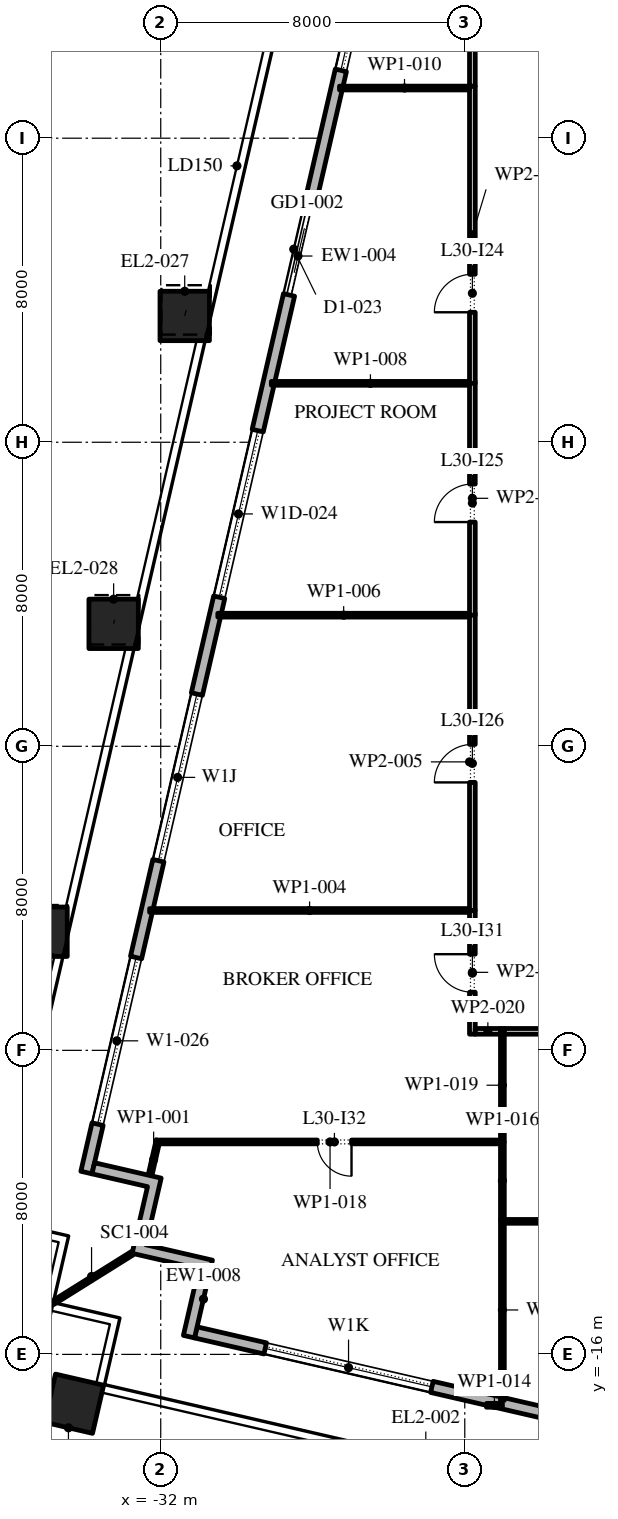
"""IFC4 building model, lengths in metres.
Left out: names, types, materials, properties, quantities, classifications, styles, units other than length and angle.
Written with IfcOpenShell. Run it as: python <this file> out.ifc"""

import sys

from ifc_helpers import new_model, si_unit, direction, frame, frame_2d, origin, origin_2d, place, context, subcontext, project, spatial, polyline, rectangle, outline, extrude, element, fill, save


model = new_model("IFC4")
c1 = context("Model", 3, precision=1e-05, world=origin(), true_north=direction((0.0, 1.0)))
c2 = subcontext(c1, "Body", "Model", "MODEL_VIEW")
j1 = project(units=[si_unit("LENGTHUNIT", "METRE"), si_unit("PLANEANGLEUNIT", "RADIAN")], contexts=[c1])
p1 = place(None, origin())
s1 = spatial("IfcSite", under=j1, at=p1, CompositionType="ELEMENT")
p2 = place(p1, origin())
s2 = spatial("IfcBuilding", under=s1, at=p2, CompositionType="ELEMENT")
p3 = place(p2, frame((0.0, 0.0, 139.2)))
s3 = spatial("IfcBuildingStorey", under=s2, at=p3, CompositionType="ELEMENT", Elevation=139.2)
p4 = place(p3, frame((-34.282, -17.298, 0.0), z_axis=(0.0, 0.0, 1.0), x_axis=(0.974370064785, -0.224951054344, 0.0)))
e1 = element("IfcColumn", 1, at=p4, inside=s3, PredefinedType="COLUMN", context=c2, shape_type="SweptSolid", body=[
    extrude(rectangle(XDim=1.3, YDim=1.3, at=origin_2d()), origin(), (0.0, 0.0, 1.0), 4.2),
])
p5 = place(p3, frame((-31.369, 11.323, 0.0), z_axis=(0.008770884695, 0.037929719907, 0.99924191662), x_axis=(-0.974290512438, 0.225295355862, 0.0)))
e2 = element("IfcColumn", 2, at=p5, inside=s3, PredefinedType="COLUMN", context=c2, shape_type="SweptSolid", body=[
    extrude(rectangle(XDim=1.3, YDim=1.3, at=origin_2d()), origin(), (0.0, 0.0, 1.0), 4.203),
])
p6 = place(p3, frame((-33.24, 3.222, 0.0), z_axis=(0.005869083212, 0.025335844359, 0.999661767226), x_axis=(-0.974202561131, 0.225675363932, 0.0)))
e3 = element("IfcColumn", 3, at=p6, inside=s3, PredefinedType="COLUMN", context=c2, shape_type="SweptSolid", body=[
    extrude(rectangle(XDim=1.3, YDim=1.3, at=origin_2d()), origin(), (0.0, 0.0, 1.0), 4.201),
])
p7 = place(p3, frame((-35.11, -4.879, 0.0), z_axis=(0.002906226325, 0.012613022249, 0.99991622925), x_axis=(-0.974466825284, 0.224531526563, 0.0)))
e4 = element("IfcColumn", 4, at=p7, inside=s3, PredefinedType="COLUMN", context=c2, shape_type="SweptSolid", body=[
    extrude(rectangle(XDim=1.3, YDim=1.3, at=origin_2d()), origin(), (0.0, 0.0, 1.0), 4.2),
])
p8 = place(p3, frame((-35.631, -15.139, 0.0), z_axis=(0.0, 0.0, 1.0), x_axis=(0.974370064785, -0.224951054344, 0.0)))
e5 = element("IfcColumn", 5, at=p8, inside=s3, PredefinedType="COLUMN", context=c2, shape_type="SweptSolid", body=[
    extrude(rectangle(XDim=1.3, YDim=1.3, at=origin_2d()), origin(), (0.0, 0.0, 1.0), 4.2),
])
p9 = place(p3, frame((-31.078, -15.421, 0.0), z_axis=(0.0, 0.0, 1.0), x_axis=(0.974370456532, -0.224949357493, 0.0)))
e6 = element("IfcWall", 6, at=p9, inside=s3, PredefinedType="STANDARD", context=c2, shape_type="SweptSolid", body=[
    extrude(rectangle(XDim=51.0, YDim=0.3, at=frame_2d((25.5, 0.0))), origin(), (0.0, 0.0, 1.0), 4.0),
])
p10 = place(p9, frame((1.875, 0.0, 0.45)))
e7 = element("IfcOpeningElement", 7, at=p10, cuts=e6, PredefinedType="OPENING", context=c2, shape_type="SweptSolid", body=[
    extrude(rectangle(XDim=4.5, YDim=2.65, at=frame_2d((2.25, 1.325))), frame((0.0, 0.16, 0.0), z_axis=(0.0, -1.0, 0.0), x_axis=(1.0, 0.0, 0.0)), (0.0, 0.0, 1.0), 0.32),
])
p11 = place(p9, frame((10.275, 0.0, 0.45)))
e8 = element("IfcOpeningElement", 8, at=p11, cuts=e6, PredefinedType="OPENING", context=c2, shape_type="SweptSolid", body=[
    extrude(rectangle(XDim=4.5, YDim=2.525, at=frame_2d((2.25, 1.262))), frame((0.0, 0.16, 0.0), z_axis=(0.0, -1.0, 0.0), x_axis=(1.0, 0.0, 0.0)), (0.0, 0.0, 1.0), 0.32),
])
p12 = place(p9, frame((18.825, 0.0, 0.45)))
e9 = element("IfcOpeningElement", 9, at=p12, cuts=e6, PredefinedType="OPENING", context=c2, shape_type="SweptSolid", body=[
    extrude(rectangle(XDim=4.5, YDim=2.5, at=frame_2d((2.25, 1.25))), frame((0.0, 0.16, 0.0), z_axis=(0.0, -1.0, 0.0), x_axis=(1.0, 0.0, 0.0)), (0.0, 0.0, 1.0), 0.32),
])
p13 = place(p9, frame((28.425, 0.0, 0.0)))
e10 = element("IfcOpeningElement", 10, at=p13, cuts=e6, PredefinedType="OPENING", context=c2, shape_type="SweptSolid", body=[
    extrude(rectangle(XDim=2.4, YDim=2.9, at=frame_2d((1.2, 1.45))), frame((0.0, 0.16, 0.0), z_axis=(0.0, -1.0, 0.0), x_axis=(1.0, 0.0, 0.0)), (0.0, 0.0, 1.0), 0.32),
])
p14 = place(p9, frame((35.925, 0.0, 0.45)))
e11 = element("IfcOpeningElement", 11, at=p14, cuts=e6, PredefinedType="OPENING", context=c2, shape_type="SweptSolid", body=[
    extrude(rectangle(XDim=4.5, YDim=2.45, at=frame_2d((2.25, 1.225))), frame((0.0, 0.16, 0.0), z_axis=(0.0, -1.0, 0.0), x_axis=(1.0, 0.0, 0.0)), (0.0, 0.0, 1.0), 0.32),
])
p15 = place(p9, frame((44.475, 0.0, 0.45)))
e12 = element("IfcOpeningElement", 12, at=p15, cuts=e6, PredefinedType="OPENING", context=c2, shape_type="SweptSolid", body=[
    extrude(rectangle(XDim=4.5, YDim=2.45, at=frame_2d((2.25, 1.225))), frame((0.0, 0.16, 0.0), z_axis=(0.0, -1.0, 0.0), x_axis=(1.0, 0.0, 0.0)), (0.0, 0.0, 1.0), 0.32),
])
p16 = place(p3, frame((-22.82, 37.016, 0.0), z_axis=(0.0, 0.0, 1.0), x_axis=(-0.224953880882, -0.974369412223, 0.0)))
e13 = element("IfcWall", 13, at=p16, inside=s3, PredefinedType="STANDARD", context=c2, shape_type="SweptSolid", body=[
    extrude(rectangle(XDim=49.5, YDim=0.3, at=frame_2d((24.75, 0.0))), origin(), (0.0, 0.0, 1.0), 4.0),
])
p17 = place(p16, frame((1.157, 0.0, 0.45)))
e14 = element("IfcOpeningElement", 14, at=p17, cuts=e13, PredefinedType="OPENING", context=c2, shape_type="SweptSolid", body=[
    extrude(rectangle(XDim=4.5, YDim=3.05, at=frame_2d((2.25, 1.525))), frame((0.0, 0.16, 0.0), z_axis=(0.0, -1.0, 0.0), x_axis=(1.0, 0.0, 0.0)), (0.0, 0.0, 1.0), 0.32),
])
p18 = place(p16, frame((8.121, 0.0, 0.45)))
e15 = element("IfcOpeningElement", 15, at=p18, cuts=e13, PredefinedType="OPENING", context=c2, shape_type="SweptSolid", body=[
    extrude(rectangle(XDim=4.5, YDim=3.05, at=frame_2d((2.25, 1.525))), frame((0.0, 0.16, 0.0), z_axis=(0.0, -1.0, 0.0), x_axis=(1.0, 0.0, 0.0)), (0.0, 0.0, 1.0), 0.32),
])
p19 = place(p16, frame((15.236, 0.0, 0.45)))
e16 = element("IfcOpeningElement", 16, at=p19, cuts=e13, PredefinedType="OPENING", context=c2, shape_type="SweptSolid", body=[
    extrude(rectangle(XDim=4.5, YDim=3.05, at=frame_2d((2.25, 1.525))), frame((0.0, 0.16, 0.0), z_axis=(0.0, -1.0, 0.0), x_axis=(1.0, 0.0, 0.0)), (0.0, 0.0, 1.0), 0.32),
])
p20 = place(p16, frame((23.4, 0.0, 0.0)))
e17 = element("IfcOpeningElement", 17, at=p20, cuts=e13, PredefinedType="OPENING", context=c2, shape_type="SweptSolid", body=[
    extrude(rectangle(XDim=2.4, YDim=3.5, at=frame_2d((1.2, 1.75))), frame((0.0, 0.16, 0.0), z_axis=(0.0, -1.0, 0.0), x_axis=(1.0, 0.0, 0.0)), (0.0, 0.0, 1.0), 0.32),
])
p21 = place(p16, frame((29.464, 0.0, 0.45)))
e18 = element("IfcOpeningElement", 18, at=p21, cuts=e13, PredefinedType="OPENING", context=c2, shape_type="SweptSolid", body=[
    extrude(rectangle(XDim=4.5, YDim=2.875, at=frame_2d((2.25, 1.438))), frame((0.0, 0.16, 0.0), z_axis=(0.0, -1.0, 0.0), x_axis=(1.0, 0.0, 0.0)), (0.0, 0.0, 1.0), 0.32),
])
p22 = place(p16, frame((36.579, 0.0, 0.45)))
e19 = element("IfcOpeningElement", 19, at=p22, cuts=e13, PredefinedType="OPENING", context=c2, shape_type="SweptSolid", body=[
    extrude(rectangle(XDim=4.5, YDim=2.675, at=frame_2d((2.25, 1.337))), frame((0.0, 0.16, 0.0), z_axis=(0.0, -1.0, 0.0), x_axis=(1.0, 0.0, 0.0)), (0.0, 0.0, 1.0), 0.32),
])
p23 = place(p16, frame((43.693, 0.0, 0.45)))
e20 = element("IfcOpeningElement", 20, at=p23, cuts=e13, PredefinedType="OPENING", context=c2, shape_type="SweptSolid", body=[
    extrude(rectangle(XDim=4.5, YDim=3.05, at=frame_2d((2.25, 1.525))), frame((0.0, 0.16, 0.0), z_axis=(0.0, -1.0, 0.0), x_axis=(1.0, 0.0, 0.0)), (0.0, 0.0, 1.0), 0.32),
])
p24 = place(p3, origin())
e21 = element("IfcWall", 21, at=p24, inside=s3, PredefinedType="STANDARD", context=c2, shape_type="SweptSolid", body=[
    extrude(outline(polyline([(-32.393, -13.116), (-30.639, -13.521), (-31.111, -15.567), (-31.404, -15.5), (-30.999, -13.746), (-32.753, -13.341), (-32.348, -11.587), (-33.809, -11.25), (-33.742, -10.957), (-31.988, -11.362), (-32.393, -13.116)])), origin(), (0.0, 0.0, 1.0), 4.0),
])
p25 = place(p3, frame((-32.753, -13.341, -0.05), z_axis=(0.0, 0.0, 1.0), x_axis=(-0.848059759764, -0.529900598103, 0.0)))
e22 = element("IfcWall", 22, at=p25, inside=s3, PredefinedType="STANDARD", context=c2, shape_type="SweptSolid", body=[
    extrude(rectangle(XDim=2.455, YDim=0.1, at=frame_2d((1.228, 0.0))), origin(), (0.0, 0.0, 1.0), 4.05),
])
p26 = place(p3, frame((-32.069, -10.361, 0.0), z_axis=(0.0, 0.0, 1.0), x_axis=(-0.222987762652, -0.974821243976, 0.0)))
e23 = element("IfcWall", 23, at=p26, inside=s3, PredefinedType="PARTITIONING", context=c2, shape_type="SweptSolid", body=[
    extrude(rectangle(XDim=1.058, YDim=0.1, at=frame_2d((0.529, 0.0))), origin(), (0.0, 0.0, 1.0), 4.0),
])
p27 = place(p3, frame((-23.8, -7.575, 0.0), z_axis=(0.0, 0.0, 1.0), x_axis=(0.0, 1.0, 0.0)))
e24 = element("IfcWall", 24, at=p27, inside=s3, PredefinedType="PARTITIONING", context=c2, shape_type="SweptSolid", body=[
    extrude(rectangle(XDim=3.255, YDim=0.15, at=frame_2d((1.627, 0.0))), origin(), (0.0, 0.0, 1.0), 4.0),
])
p28 = place(p27, frame((1.105, 0.0, 0.0)))
e25 = element("IfcOpeningElement", 25, at=p28, cuts=e24, PredefinedType="OPENING", context=c2, shape_type="SweptSolid", body=[
    extrude(rectangle(XDim=1.0, YDim=2.1, at=frame_2d((0.5, 1.05))), frame((0.0, 0.085, 0.0), z_axis=(0.0, -1.0, 0.0), x_axis=(1.0, 0.0, 0.0)), (0.0, 0.0, 1.0), 0.17),
])
p29 = place(p3, frame((-23.875, -4.32, 0.0), z_axis=(0.0, 0.0, 1.0), x_axis=(-1.0, 0.0, 0.0)))
e26 = element("IfcWall", 26, at=p29, inside=s3, PredefinedType="PARTITIONING", context=c2, shape_type="SweptSolid", body=[
    extrude(rectangle(XDim=8.417, YDim=0.1, at=frame_2d((4.208, 0.0))), origin(), (0.0, 0.0, 1.0), 4.0),
])
p30 = place(p3, frame((-23.8, -4.32, 0.0), z_axis=(0.0, 0.0, 1.0), x_axis=(0.0, 1.0, 0.0)))
e27 = element("IfcWall", 27, at=p30, inside=s3, PredefinedType="PARTITIONING", context=c2, shape_type="SweptSolid", body=[
    extrude(rectangle(XDim=7.82, YDim=0.15, at=frame_2d((3.91, 0.0))), origin(), (0.0, 0.0, 1.0), 4.0),
])
p31 = place(p30, frame((3.37, 0.0, 0.0)))
e28 = element("IfcOpeningElement", 28, at=p31, cuts=e27, PredefinedType="OPENING", context=c2, shape_type="SweptSolid", body=[
    extrude(rectangle(XDim=1.0, YDim=2.1, at=frame_2d((0.5, 1.05))), frame((0.0, 0.085, 0.0), z_axis=(0.0, -1.0, 0.0), x_axis=(1.0, 0.0, 0.0)), (0.0, 0.0, 1.0), 0.17),
])
p32 = place(p3, frame((-23.875, 3.45, 0.0), z_axis=(0.0, 0.0, 1.0), x_axis=(-1.0, 0.0, 0.0)))
e29 = element("IfcWall", 29, at=p32, inside=s3, PredefinedType="PARTITIONING", context=c2, shape_type="SweptSolid", body=[
    extrude(rectangle(XDim=6.623, YDim=0.1, at=frame_2d((3.312, 0.0))), origin(), (0.0, 0.0, 1.0), 4.0),
])
p33 = place(p3, frame((-23.8, 3.45, 0.0), z_axis=(0.0, 0.0, 1.0), x_axis=(0.0, 1.0, 0.0)))
e30 = element("IfcWall", 30, at=p33, inside=s3, PredefinedType="PARTITIONING", context=c2, shape_type="SweptSolid", body=[
    extrude(rectangle(XDim=6.15, YDim=0.15, at=frame_2d((3.075, 0.0))), origin(), (0.0, 0.0, 1.0), 4.0),
])
p34 = place(p33, frame((2.45, 0.0, 0.0)))
e31 = element("IfcOpeningElement", 31, at=p34, cuts=e30, PredefinedType="OPENING", context=c2, shape_type="SweptSolid", body=[
    extrude(rectangle(XDim=1.0, YDim=2.1, at=frame_2d((0.5, 1.05))), frame((0.0, 0.085, 0.0), z_axis=(0.0, -1.0, 0.0), x_axis=(1.0, 0.0, 0.0)), (0.0, 0.0, 1.0), 0.17),
])
p35 = place(p3, frame((-23.875, 9.55, 0.0), z_axis=(0.0, 0.0, 1.0), x_axis=(-1.0, 0.0, 0.0)))
e32 = element("IfcWall", 32, at=p35, inside=s3, PredefinedType="PARTITIONING", context=c2, shape_type="SweptSolid", body=[
    extrude(rectangle(XDim=5.215, YDim=0.1, at=frame_2d((2.607, 0.0))), origin(), (0.0, 0.0, 1.0), 4.0),
])
p36 = place(p3, frame((-23.8, 9.55, 0.0), z_axis=(0.0, 0.0, 1.0), x_axis=(0.0, 1.0, 0.0)))
e33 = element("IfcWall", 33, at=p36, inside=s3, PredefinedType="PARTITIONING", context=c2, shape_type="SweptSolid", body=[
    extrude(rectangle(XDim=7.82, YDim=0.15, at=frame_2d((3.91, 0.0))), origin(), (0.0, 0.0, 1.0), 4.0),
])
p37 = place(p36, frame((1.87, 0.0, 0.0)))
e34 = element("IfcOpeningElement", 34, at=p37, cuts=e33, PredefinedType="OPENING", context=c2, shape_type="SweptSolid", body=[
    extrude(rectangle(XDim=1.0, YDim=2.1, at=frame_2d((0.5, 1.05))), frame((0.0, 0.085, 0.0), z_axis=(0.0, -1.0, 0.0), x_axis=(1.0, 0.0, 0.0)), (0.0, 0.0, 1.0), 0.17),
])
p38 = place(p3, frame((-23.875, 17.32, 0.0), z_axis=(0.0, 0.0, 1.0), x_axis=(-1.0, 0.0, 0.0)))
e35 = element("IfcWall", 35, at=p38, inside=s3, PredefinedType="PARTITIONING", context=c2, shape_type="SweptSolid", body=[
    extrude(rectangle(XDim=3.421, YDim=0.1, at=frame_2d((1.71, 0.0))), origin(), (0.0, 0.0, 1.0), 4.0),
])
p39 = place(p3, frame((-23.8, 17.37, 0.0), z_axis=(0.0, 0.0, 1.0), x_axis=(0.0, 1.0, 0.0)))
e36 = element("IfcWall", 36, at=p39, inside=s3, PredefinedType="PARTITIONING", context=c2, shape_type="SweptSolid", body=[
    extrude(rectangle(XDim=6.115, YDim=0.15, at=frame_2d((3.058, 0.0))), origin(), (0.0, 0.0, 1.0), 4.0),
])
p40 = place(p39, frame((1.89, 0.0, 0.0)))
e37 = element("IfcOpeningElement", 37, at=p40, cuts=e36, PredefinedType="OPENING", context=c2, shape_type="SweptSolid", body=[
    extrude(rectangle(XDim=1.0, YDim=2.1, at=frame_2d((0.5, 1.05))), frame((0.0, 0.085, 0.0), z_axis=(0.0, -1.0, 0.0), x_axis=(1.0, 0.0, 0.0)), (0.0, 0.0, 1.0), 0.17),
])
p41 = place(p3, frame((-23.43, -17.34, 0.0), z_axis=(0.0, 0.0, 1.0), x_axis=(1.0, 0.0, 0.0)))
e38 = element("IfcWall", 38, at=p41, inside=s3, PredefinedType="PARTITIONING", context=c2, shape_type="SweptSolid", body=[
    extrude(rectangle(XDim=0.42, YDim=0.1, at=frame_2d((0.21, 0.0))), origin(), (0.0, 0.0, 1.0), 4.0),
])
p42 = place(p3, frame((-23.01, -17.212, 0.0), z_axis=(0.0, 0.0, 1.0), x_axis=(0.0, 1.0, 0.0)))
e39 = element("IfcWall", 39, at=p42, inside=s3, PredefinedType="PARTITIONING", context=c2, shape_type="SweptSolid", body=[
    extrude(rectangle(XDim=4.762, YDim=0.1, at=frame_2d((2.381, 0.0))), origin(), (0.0, 0.0, 1.0), 4.0),
])
p43 = place(p3, frame((-23.01, -12.45, 0.0), z_axis=(0.0, 0.0, 1.0), x_axis=(0.0, 1.0, 0.0)))
e40 = element("IfcWall", 40, at=p43, inside=s3, PredefinedType="PARTITIONING", context=c2, shape_type="SweptSolid", body=[
    extrude(rectangle(XDim=2.04, YDim=0.1, at=frame_2d((1.02, 0.0))), origin(), (0.0, 0.0, 1.0), 4.0),
])
p44 = place(p3, frame((-22.96, -12.5, 0.0), z_axis=(0.0, 0.0, 1.0), x_axis=(1.0, 0.0, 0.0)))
e41 = element("IfcWall", 41, at=p44, inside=s3, PredefinedType="PARTITIONING", context=c2, shape_type="SweptSolid", body=[
    extrude(rectangle(XDim=9.51, YDim=0.1, at=frame_2d((4.755, 0.0))), origin(), (0.0, 0.0, 1.0), 4.0),
])
p45 = place(p44, frame((3.4, 0.0, 0.0)))
e42 = element("IfcOpeningElement", 42, at=p45, cuts=e41, PredefinedType="OPENING", context=c2, shape_type="SweptSolid", body=[
    extrude(rectangle(XDim=0.9, YDim=2.1, at=frame_2d((0.45, 1.05))), frame((0.0, 0.06, 0.0), z_axis=(0.0, -1.0, 0.0), x_axis=(1.0, 0.0, 0.0)), (0.0, 0.0, 1.0), 0.12),
])
p46 = place(p3, frame((-23.06, -10.41, 0.0), z_axis=(0.0, 0.0, 1.0), x_axis=(-1.0, 0.0, 0.0)))
e43 = element("IfcWall", 43, at=p46, inside=s3, PredefinedType="PARTITIONING", context=c2, shape_type="SweptSolid", body=[
    extrude(rectangle(XDim=8.97, YDim=0.1, at=frame_2d((4.485, 0.0))), origin(), (0.0, 0.0, 1.0), 4.0),
])
p47 = place(p46, frame((3.92, 0.0, 0.0)))
e44 = element("IfcOpeningElement", 44, at=p47, cuts=e43, PredefinedType="OPENING", context=c2, shape_type="SweptSolid", body=[
    extrude(rectangle(XDim=0.9, YDim=2.1, at=frame_2d((0.45, 1.05))), frame((0.0, 0.06, 0.0), z_axis=(0.0, -1.0, 0.0), x_axis=(1.0, 0.0, 0.0)), (0.0, 0.0, 1.0), 0.12),
])
p48 = place(p3, frame((-23.01, -10.41, 0.0), z_axis=(0.0, 0.0, 1.0), x_axis=(0.0, 1.0, 0.0)))
e45 = element("IfcWall", 45, at=p48, inside=s3, PredefinedType="PARTITIONING", context=c2, shape_type="SweptSolid", body=[
    extrude(rectangle(XDim=2.985, YDim=0.1, at=frame_2d((1.492, 0.0))), origin(), (0.0, 0.0, 1.0), 4.0),
])
p49 = place(p3, frame((-23.06, -7.5, 0.0), z_axis=(0.0, 0.0, 1.0), x_axis=(-1.0, 0.0, 0.0)))
e46 = element("IfcWall", 46, at=p49, inside=s3, PredefinedType="PARTITIONING", context=c2, shape_type="SweptSolid", body=[
    extrude(rectangle(XDim=0.665, YDim=0.15, at=frame_2d((0.333, 0.0))), origin(), (0.0, 0.0, 1.0), 4.0),
])
p50 = place(p3, frame((-13.55, -7.5, 0.0), z_axis=(0.0, 0.0, 1.0), x_axis=(-1.0, 0.0, 0.0)))
e47 = element("IfcWall", 47, at=p50, inside=s3, PredefinedType="PARTITIONING", context=c2, shape_type="SweptSolid", body=[
    extrude(rectangle(XDim=9.41, YDim=0.15, at=frame_2d((4.705, 0.0))), origin(), (0.0, 0.0, 1.0), 4.0),
])
p51 = place(p50, frame((6.06, 0.0, 0.0)))
e48 = element("IfcOpeningElement", 48, at=p51, cuts=e47, PredefinedType="OPENING", context=c2, shape_type="SweptSolid", body=[
    extrude(rectangle(XDim=1.0, YDim=2.1, at=frame_2d((0.5, 1.05))), frame((0.0, 0.085, 0.0), z_axis=(0.0, -1.0, 0.0), x_axis=(1.0, 0.0, 0.0)), (0.0, 0.0, 1.0), 0.17),
])
p52 = place(p10, origin())
e49 = element("IfcWindow", 49, at=p52, inside=s3, PartitioningType="DOUBLE_PANEL_VERTICAL", PredefinedType="WINDOW", context=c2, shape_type="SweptSolid", body=[
    extrude(rectangle(XDim=4.5, YDim=2.65, at=frame_2d((2.25, 1.325))), frame((0.0, 0.03, 0.0), z_axis=(0.0, -1.0, 0.0), x_axis=(1.0, 0.0, 0.0)), (0.0, 0.0, 1.0), 0.06),
])
fill(e7, e49)
p53 = place(p19, origin())
e50 = element("IfcWindow", 50, at=p53, inside=s3, PartitioningType="DOUBLE_PANEL_VERTICAL", PredefinedType="WINDOW", context=c2, shape_type="SweptSolid", body=[
    extrude(rectangle(XDim=4.5, YDim=3.05, at=frame_2d((2.25, 1.525))), frame((0.0, 0.03, 0.0), z_axis=(0.0, -1.0, 0.0), x_axis=(1.0, 0.0, 0.0)), (0.0, 0.0, 1.0), 0.06),
])
fill(e16, e50)
p54 = place(p20, origin())
e51 = element("IfcDoor", 51, at=p54, inside=s3, OperationType="DOUBLE_DOOR_SLIDING", PredefinedType="DOOR", context=c2, shape_type="SweptSolid", body=[
    extrude(rectangle(XDim=2.4, YDim=3.5, at=frame_2d((1.2, 1.75))), frame((0.0, 0.025, 0.0), z_axis=(0.0, -1.0, 0.0), x_axis=(1.0, 0.0, 0.0)), (0.0, 0.0, 1.0), 0.05),
])
fill(e17, e51)
p55 = place(p21, origin())
e52 = element("IfcWindow", 52, at=p55, inside=s3, PartitioningType="DOUBLE_PANEL_VERTICAL", PredefinedType="WINDOW", context=c2, shape_type="SweptSolid", body=[
    extrude(rectangle(XDim=4.5, YDim=2.875, at=frame_2d((2.25, 1.438))), frame((0.0, 0.03, 0.0), z_axis=(0.0, -1.0, 0.0), x_axis=(1.0, 0.0, 0.0)), (0.0, 0.0, 1.0), 0.06),
])
fill(e18, e52)
p56 = place(p22, origin())
e53 = element("IfcWindow", 53, at=p56, inside=s3, PartitioningType="DOUBLE_PANEL_VERTICAL", PredefinedType="WINDOW", context=c2, shape_type="SweptSolid", body=[
    extrude(rectangle(XDim=4.5, YDim=2.675, at=frame_2d((2.25, 1.337))), frame((0.0, 0.03, 0.0), z_axis=(0.0, -1.0, 0.0), x_axis=(1.0, 0.0, 0.0)), (0.0, 0.0, 1.0), 0.06),
])
fill(e19, e53)
p57 = place(p23, origin())
e54 = element("IfcWindow", 54, at=p57, inside=s3, PartitioningType="DOUBLE_PANEL_VERTICAL", PredefinedType="WINDOW", context=c2, shape_type="SweptSolid", body=[
    extrude(rectangle(XDim=4.5, YDim=3.05, at=frame_2d((2.25, 1.525))), frame((0.0, 0.03, 0.0), z_axis=(0.0, -1.0, 0.0), x_axis=(1.0, 0.0, 0.0)), (0.0, 0.0, 1.0), 0.06),
])
fill(e20, e54)
p58 = place(p37, origin())
e55 = element("IfcDoor", 55, at=p58, inside=s3, OperationType="SINGLE_SWING_RIGHT", PredefinedType="DOOR", context=c2, shape_type="SweptSolid", body=[
    extrude(rectangle(XDim=1.0, YDim=2.1, at=frame_2d((0.5, 1.05))), frame((0.0, 0.025, 0.0), z_axis=(0.0, -1.0, 0.0), x_axis=(1.0, 0.0, 0.0)), (0.0, 0.0, 1.0), 0.05),
])
fill(e34, e55)
p59 = place(p34, origin())
e56 = element("IfcDoor", 56, at=p59, inside=s3, OperationType="SINGLE_SWING_RIGHT", PredefinedType="DOOR", context=c2, shape_type="SweptSolid", body=[
    extrude(rectangle(XDim=1.0, YDim=2.1, at=frame_2d((0.5, 1.05))), frame((0.0, 0.025, 0.0), z_axis=(0.0, -1.0, 0.0), x_axis=(1.0, 0.0, 0.0)), (0.0, 0.0, 1.0), 0.05),
])
fill(e31, e56)
p60 = place(p31, origin())
e57 = element("IfcDoor", 57, at=p60, inside=s3, OperationType="SINGLE_SWING_RIGHT", PredefinedType="DOOR", context=c2, shape_type="SweptSolid", body=[
    extrude(rectangle(XDim=1.0, YDim=2.1, at=frame_2d((0.5, 1.05))), frame((0.0, 0.025, 0.0), z_axis=(0.0, -1.0, 0.0), x_axis=(1.0, 0.0, 0.0)), (0.0, 0.0, 1.0), 0.05),
])
fill(e28, e57)
p61 = place(p28, origin())
e58 = element("IfcDoor", 58, at=p61, inside=s3, OperationType="SINGLE_SWING_LEFT", PredefinedType="DOOR", context=c2, shape_type="SweptSolid", body=[
    extrude(rectangle(XDim=1.0, YDim=2.1, at=frame_2d((0.5, 1.05))), frame((0.0, 0.025, 0.0), z_axis=(0.0, -1.0, 0.0), x_axis=(1.0, 0.0, 0.0)), (0.0, 0.0, 1.0), 0.05),
])
fill(e25, e58)
p62 = place(p47, origin())
e59 = element("IfcDoor", 59, at=p62, inside=s3, OperationType="SINGLE_SWING_RIGHT", PredefinedType="DOOR", context=c2, shape_type="SweptSolid", body=[
    extrude(rectangle(XDim=0.9, YDim=2.1, at=frame_2d((0.45, 1.05))), frame((0.0, 0.025, 0.0), z_axis=(0.0, -1.0, 0.0), x_axis=(1.0, 0.0, 0.0)), (0.0, 0.0, 1.0), 0.05),
])
fill(e44, e59)
save(model, sys.argv[1])
